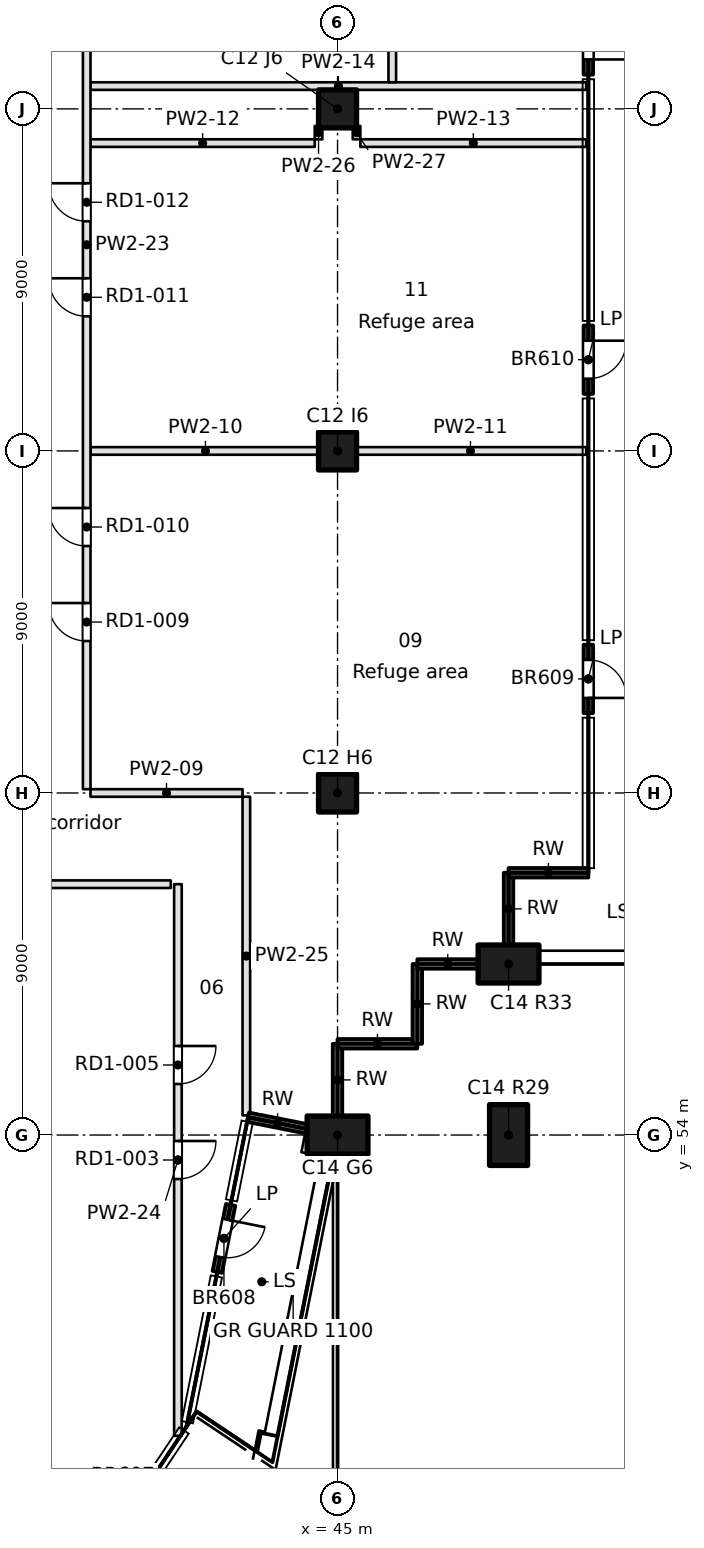
"""IFC4 building model, lengths in metres.
Left out: names, types, materials, properties, quantities, classifications, styles, units other than length and angle.
Written with IfcOpenShell. Run it as: python <this file> out.ifc"""

import sys

from ifc_helpers import new_model, si_unit, direction, frame, frame_2d, origin, origin_2d, place, context, subcontext, project, spatial, rectangle, extrude, element, fill, save


model = new_model("IFC4")
c1 = context("Model", 3, precision=1e-05, world=origin(), true_north=direction((0.0, 1.0)))
c2 = subcontext(c1, "Body", "Model", "MODEL_VIEW")
j1 = project(units=[si_unit("LENGTHUNIT", "METRE"), si_unit("PLANEANGLEUNIT", "RADIAN")], contexts=[c1])
p1 = place(None, origin())
s1 = spatial("IfcSite", under=j1, at=p1, CompositionType="ELEMENT")
p2 = place(p1, origin())
s2 = spatial("IfcBuilding", under=s1, at=p2, CompositionType="ELEMENT")
p3 = place(p2, frame((0.0, 0.0, 276.2)))
s3 = spatial("IfcBuildingStorey", under=s2, at=p3, CompositionType="ELEMENT", Elevation=276.2)
for number, where, z_axis, x_axis in (
    (1, (45.0, 54.0, 0.0), (0.0, 0.0, 1.0), (1.0, 0.0, 0.0)),
    (2, (49.5, 54.0, 0.0), (0.0, 0.0, 1.0), (0.0, 1.0, 0.0)),
    (3, (49.5, 58.5, 0.0), (0.0, 0.0, 1.0), (1.0, 0.0, 0.0)),
):
    element("IfcColumn", number, at=place(p3, frame(where, z_axis=z_axis, x_axis=x_axis)), inside=s3, PredefinedType="COLUMN", context=c2, shape_type="SweptSolid", body=[
        extrude(rectangle(XDim=1.6, YDim=1.0, at=origin_2d()), origin(), (0.0, 0.0, 1.0), 4.6),
    ])
for number, where, z_axis, x_axis in (
    (4, (45.0, 63.0, 0.0), (0.0, 0.0, 1.0), (1.0, 0.0, 0.0)),
    (5, (45.0, 72.0, 0.0), (0.0, 0.0, 1.0), (1.0, 0.0, 0.0)),
    (6, (45.0, 81.0, 0.0), (0.0, 0.0, 1.0), (1.0, 0.0, 0.0)),
):
    element("IfcColumn", number, at=place(p3, frame(where, z_axis=z_axis, x_axis=x_axis)), inside=s3, PredefinedType="COLUMN", context=c2, shape_type="SweptSolid", body=[
        extrude(rectangle(XDim=1.0, YDim=1.0, at=origin_2d()), origin(), (0.0, 0.0, 1.0), 4.6),
    ])
p4 = place(p3, frame((41.835, 50.398, 0.0), z_axis=(0.0, 0.0, 1.0), x_axis=(0.19517704197, 0.980768026746, 0.0)))
e7 = element("IfcWall", 7, at=p4, inside=s3, PredefinedType="SOLIDWALL", context=c2, shape_type="SweptSolid", body=[
    extrude(rectangle(XDim=1.8, YDim=0.25, at=frame_2d((0.9, 0.0))), origin(), (0.0, 0.0, 1.0), 4.2),
])
p5 = place(p4, frame((0.4, 0.0, 0.0)))
e8 = element("IfcOpeningElement", 8, at=p5, cuts=e7, PredefinedType="OPENING", context=c2, shape_type="SweptSolid", body=[
    extrude(rectangle(XDim=1.0, YDim=2.1, at=frame_2d((0.5, 1.05))), frame((0.0, 0.125, 0.0), z_axis=(0.0, -1.0, 0.0), x_axis=(1.0, 0.0, 0.0)), (0.0, 0.0, 1.0), 0.25),
])
p6 = place(p3, frame((42.645, 54.469, 0.0), z_axis=(0.0, 0.0, 1.0), x_axis=(0.980834583039, -0.194842297039, 0.0)))
e9 = element("IfcWall", 9, at=p6, inside=s3, PredefinedType="SOLIDWALL", context=c2, shape_type="SweptSolid", body=[
    extrude(rectangle(XDim=1.585, YDim=0.25, at=frame_2d((0.792, 0.0))), origin(), (0.0, 0.0, 1.0), 4.2),
])
p7 = place(p3, frame((44.999, 54.5, 0.0), z_axis=(0.0, 0.0, 1.0), x_axis=(0.000128452151, 0.99999999175, 0.0)))
e10 = element("IfcWall", 10, at=p7, inside=s3, PredefinedType="SOLIDWALL", context=c2, shape_type="SweptSolid", body=[
    extrude(rectangle(XDim=1.901, YDim=0.25, at=frame_2d((0.95, 0.0))), origin(), (0.0, 0.0, 1.0), 4.2),
])
p8 = place(p3, frame((44.999, 56.401, 0.0), z_axis=(0.0, 0.0, 1.0), x_axis=(0.999999993241, 0.00011626555, 0.0)))
e11 = element("IfcWall", 11, at=p8, inside=s3, PredefinedType="SOLIDWALL", context=c2, shape_type="SweptSolid", body=[
    extrude(rectangle(XDim=2.1, YDim=0.25, at=frame_2d((1.05, 0.0))), origin(), (0.0, 0.0, 1.0), 4.2),
])
p9 = place(p3, frame((47.099, 56.401, 0.0), z_axis=(0.0, 0.0, 1.0), x_axis=(0.000232504063, 0.999999972971, 0.0)))
e12 = element("IfcWall", 12, at=p9, inside=s3, PredefinedType="SOLIDWALL", context=c2, shape_type="SweptSolid", body=[
    extrude(rectangle(XDim=2.1, YDim=0.25, at=frame_2d((1.05, 0.0))), origin(), (0.0, 0.0, 1.0), 4.2),
])
p10 = place(p3, frame((47.1, 58.501, 0.0), z_axis=(0.0, 0.0, 1.0), x_axis=(1.0, 0.0, 0.0)))
e13 = element("IfcWall", 13, at=p10, inside=s3, PredefinedType="SOLIDWALL", context=c2, shape_type="SweptSolid", body=[
    extrude(rectangle(XDim=1.6, YDim=0.25, at=frame_2d((0.8, 0.0))), origin(), (0.0, 0.0, 1.0), 4.2),
])
p11 = place(p3, frame((49.499, 59.0, 0.0), z_axis=(0.0, 0.0, 1.0), x_axis=(0.000256871299, 0.999999967009, 0.0)))
e14 = element("IfcWall", 14, at=p11, inside=s3, PredefinedType="SOLIDWALL", context=c2, shape_type="SweptSolid", body=[
    extrude(rectangle(XDim=1.901, YDim=0.25, at=frame_2d((0.95, 0.0))), origin(), (0.0, 0.0, 1.0), 4.2),
])
p12 = place(p3, frame((49.5, 60.901, 0.0), z_axis=(0.0, 0.0, 1.0), x_axis=(1.0, 0.0, 0.0)))
e15 = element("IfcWall", 15, at=p12, inside=s3, PredefinedType="SOLIDWALL", context=c2, shape_type="SweptSolid", body=[
    extrude(rectangle(XDim=2.1, YDim=0.25, at=frame_2d((1.05, 0.0))), origin(), (0.0, 0.0, 1.0), 4.2),
])
p13 = place(p3, frame((51.599, 65.101, 0.0), z_axis=(0.0, 0.0, 1.0), x_axis=(0.0, 1.0, 0.0)))
e16 = element("IfcWall", 16, at=p13, inside=s3, PredefinedType="SOLIDWALL", context=c2, shape_type="SweptSolid", body=[
    extrude(rectangle(XDim=1.8, YDim=0.25, at=frame_2d((0.9, 0.0))), origin(), (0.0, 0.0, 1.0), 4.2),
])
p14 = place(p13, frame((0.4, 0.0, 0.0)))
e17 = element("IfcOpeningElement", 17, at=p14, cuts=e16, PredefinedType="OPENING", context=c2, shape_type="SweptSolid", body=[
    extrude(rectangle(XDim=1.0, YDim=2.1, at=frame_2d((0.5, 1.05))), frame((0.0, 0.125, 0.0), z_axis=(0.0, -1.0, 0.0), x_axis=(1.0, 0.0, 0.0)), (0.0, 0.0, 1.0), 0.25),
])
p15 = place(p3, frame((51.599, 73.501, 0.0), z_axis=(0.0, 0.0, 1.0), x_axis=(0.0, 1.0, 0.0)))
e18 = element("IfcWall", 18, at=p15, inside=s3, PredefinedType="SOLIDWALL", context=c2, shape_type="SweptSolid", body=[
    extrude(rectangle(XDim=1.8, YDim=0.25, at=frame_2d((0.9, 0.0))), origin(), (0.0, 0.0, 1.0), 4.2),
])
p16 = place(p15, frame((0.4, 0.0, 0.0)))
e19 = element("IfcOpeningElement", 19, at=p16, cuts=e18, PredefinedType="OPENING", context=c2, shape_type="SweptSolid", body=[
    extrude(rectangle(XDim=1.0, YDim=2.1, at=frame_2d((0.5, 1.05))), frame((0.0, 0.125, 0.0), z_axis=(0.0, -1.0, 0.0), x_axis=(1.0, 0.0, 0.0)), (0.0, 0.0, 1.0), 0.25),
])
p17 = place(p3, frame((51.599, 81.9, 0.0), z_axis=(0.0, 0.0, 1.0), x_axis=(0.0, 1.0, 0.0)))
e20 = element("IfcWall", 20, at=p17, inside=s3, PredefinedType="SOLIDWALL", context=c2, shape_type="SweptSolid", body=[
    extrude(rectangle(XDim=1.8, YDim=0.25, at=frame_2d((0.9, 0.0))), origin(), (0.0, 0.0, 1.0), 4.2),
])
p18 = place(p17, frame((0.4, 0.0, 0.0)))
e21 = element("IfcOpeningElement", 21, at=p18, cuts=e20, PredefinedType="OPENING", context=c2, shape_type="SweptSolid", body=[
    extrude(rectangle(XDim=1.0, YDim=2.1, at=frame_2d((0.5, 1.05))), frame((0.0, 0.125, 0.0), z_axis=(0.0, -1.0, 0.0), x_axis=(1.0, 0.0, 0.0)), (0.0, 0.0, 1.0), 0.25),
])
p19 = place(p3, frame((40.611, 60.6, 0.0), z_axis=(0.0, 0.0, 1.0), x_axis=(-1.0, 0.0, 0.0)))
e22 = element("IfcWall", 22, at=p19, inside=s3, PredefinedType="PARTITIONING", context=c2, shape_type="SweptSolid", body=[
    extrude(rectangle(XDim=14.411, YDim=0.2, at=frame_2d((7.206, 0.0))), origin(), (0.0, 0.0, 1.0), 4.2),
])
p20 = place(p3, frame((38.5, 63.0, 0.0), z_axis=(0.0, 0.0, 1.0), x_axis=(1.0, 0.0, 0.0)))
e23 = element("IfcWall", 23, at=p20, inside=s3, PredefinedType="PARTITIONING", context=c2, shape_type="SweptSolid", body=[
    extrude(rectangle(XDim=4.0, YDim=0.2, at=frame_2d((2.0, 0.0))), origin(), (0.0, 0.0, 1.0), 4.2),
])
p21 = place(p3, frame((38.5, 72.0, 0.0), z_axis=(0.0, 0.0, 1.0), x_axis=(1.0, 0.0, 0.0)))
e24 = element("IfcWall", 24, at=p21, inside=s3, PredefinedType="PARTITIONING", context=c2, shape_type="SweptSolid", body=[
    extrude(rectangle(XDim=6.05, YDim=0.2, at=frame_2d((3.025, 0.0))), origin(), (0.0, 0.0, 1.0), 4.2),
])
p22 = place(p3, frame((45.45, 72.0, 0.0), z_axis=(0.0, 0.0, 1.0), x_axis=(1.0, 0.0, 0.0)))
e25 = element("IfcWall", 25, at=p22, inside=s3, PredefinedType="PARTITIONING", context=c2, shape_type="SweptSolid", body=[
    extrude(rectangle(XDim=6.095, YDim=0.2, at=frame_2d((3.047, 0.0))), origin(), (0.0, 0.0, 1.0), 4.2),
])
p23 = place(p3, frame((38.5, 80.1, 0.0), z_axis=(0.0, 0.0, 1.0), x_axis=(1.0, 0.0, 0.0)))
e26 = element("IfcWall", 26, at=p23, inside=s3, PredefinedType="PARTITIONING", context=c2, shape_type="SweptSolid", body=[
    extrude(rectangle(XDim=5.9, YDim=0.2, at=frame_2d((2.95, 0.0))), origin(), (0.0, 0.0, 1.0), 4.2),
])
p24 = place(p3, frame((45.6, 80.1, 0.0), z_axis=(0.0, 0.0, 1.0), x_axis=(1.0, 0.0, 0.0)))
e27 = element("IfcWall", 27, at=p24, inside=s3, PredefinedType="PARTITIONING", context=c2, shape_type="SweptSolid", body=[
    extrude(rectangle(XDim=5.945, YDim=0.2, at=frame_2d((2.972, 0.0))), origin(), (0.0, 0.0, 1.0), 4.2),
])
p25 = place(p3, frame((38.5, 81.6, 0.0), z_axis=(0.0, 0.0, 1.0), x_axis=(1.0, 0.0, 0.0)))
e28 = element("IfcWall", 28, at=p25, inside=s3, PredefinedType="PARTITIONING", context=c2, shape_type="SweptSolid", body=[
    extrude(rectangle(XDim=13.045, YDim=0.2, at=frame_2d((6.522, 0.0))), origin(), (0.0, 0.0, 1.0), 4.2),
])
p26 = place(p3, frame((38.4, 91.75, 0.0), z_axis=(0.0, 0.0, 1.0), x_axis=(0.0, -1.0, 0.0)))
e29 = element("IfcWall", 29, at=p26, inside=s3, PredefinedType="PARTITIONING", context=c2, shape_type="SweptSolid", body=[
    extrude(rectangle(XDim=28.65, YDim=0.2, at=frame_2d((14.325, 0.0))), origin(), (0.0, 0.0, 1.0), 4.2),
])
p27 = place(p26, frame((23.752, 0.0, 0.0)))
e30 = element("IfcOpeningElement", 30, at=p27, cuts=e29, PredefinedType="OPENING", context=c2, shape_type="SweptSolid", body=[
    extrude(rectangle(XDim=1.0, YDim=2.1, at=frame_2d((0.5, 1.05))), frame((0.0, 0.1, 0.0), z_axis=(0.0, -1.0, 0.0), x_axis=(1.0, 0.0, 0.0)), (0.0, 0.0, 1.0), 0.2),
])
p28 = place(p26, frame((21.252, 0.0, 0.0)))
e31 = element("IfcOpeningElement", 31, at=p28, cuts=e29, PredefinedType="OPENING", context=c2, shape_type="SweptSolid", body=[
    extrude(rectangle(XDim=1.0, YDim=2.1, at=frame_2d((0.5, 1.05))), frame((0.0, 0.1, 0.0), z_axis=(0.0, -1.0, 0.0), x_axis=(1.0, 0.0, 0.0)), (0.0, 0.0, 1.0), 0.2),
])
p29 = place(p26, frame((15.207, 0.0, 0.0)))
e32 = element("IfcOpeningElement", 32, at=p29, cuts=e29, PredefinedType="OPENING", context=c2, shape_type="SweptSolid", body=[
    extrude(rectangle(XDim=1.0, YDim=2.1, at=frame_2d((0.5, 1.05))), frame((0.0, 0.1, 0.0), z_axis=(0.0, -1.0, 0.0), x_axis=(1.0, 0.0, 0.0)), (0.0, 0.0, 1.0), 0.2),
])
p30 = place(p26, frame((12.707, 0.0, 0.0)))
e33 = element("IfcOpeningElement", 33, at=p30, cuts=e29, PredefinedType="OPENING", context=c2, shape_type="SweptSolid", body=[
    extrude(rectangle(XDim=1.0, YDim=2.1, at=frame_2d((0.5, 1.05))), frame((0.0, 0.1, 0.0), z_axis=(0.0, -1.0, 0.0), x_axis=(1.0, 0.0, 0.0)), (0.0, 0.0, 1.0), 0.2),
])
p31 = place(p26, frame((4.526, 0.0, 0.0)))
e34 = element("IfcOpeningElement", 34, at=p31, cuts=e29, PredefinedType="OPENING", context=c2, shape_type="SweptSolid", body=[
    extrude(rectangle(XDim=1.0, YDim=2.1, at=frame_2d((0.5, 1.05))), frame((0.0, 0.1, 0.0), z_axis=(0.0, -1.0, 0.0), x_axis=(1.0, 0.0, 0.0)), (0.0, 0.0, 1.0), 0.2),
])
p32 = place(p3, frame((40.8, 46.086, 0.0), z_axis=(0.0, 0.0, 1.0), x_axis=(0.0, 1.0, 0.0)))
e35 = element("IfcWall", 35, at=p32, inside=s3, PredefinedType="PARTITIONING", context=c2, shape_type="SweptSolid", body=[
    extrude(rectangle(XDim=14.514, YDim=0.2, at=frame_2d((7.257, 0.0))), origin(), (0.0, 0.0, 1.0), 4.2),
])
p33 = place(p32, frame((6.757, 0.0, 0.0)))
e36 = element("IfcOpeningElement", 36, at=p33, cuts=e35, PredefinedType="OPENING", context=c2, shape_type="SweptSolid", body=[
    extrude(rectangle(XDim=1.0, YDim=2.1, at=frame_2d((0.5, 1.05))), frame((0.0, 0.1, 0.0), z_axis=(0.0, -1.0, 0.0), x_axis=(1.0, 0.0, 0.0)), (0.0, 0.0, 1.0), 0.2),
])
p34 = place(p32, frame((9.257, 0.0, 0.0)))
e37 = element("IfcOpeningElement", 37, at=p34, cuts=e35, PredefinedType="OPENING", context=c2, shape_type="SweptSolid", body=[
    extrude(rectangle(XDim=1.0, YDim=2.1, at=frame_2d((0.5, 1.05))), frame((0.0, 0.1, 0.0), z_axis=(0.0, -1.0, 0.0), x_axis=(1.0, 0.0, 0.0)), (0.0, 0.0, 1.0), 0.2),
])
p35 = place(p3, frame((42.6, 62.9, 0.0), z_axis=(0.0, 0.0, 1.0), x_axis=(0.0, -1.0, 0.0)))
e38 = element("IfcWall", 38, at=p35, inside=s3, PredefinedType="PARTITIONING", context=c2, shape_type="SweptSolid", body=[
    extrude(rectangle(XDim=8.382, YDim=0.2, at=frame_2d((4.191, 0.0))), origin(), (0.0, 0.0, 1.0), 4.2),
])
for number, where, z_axis, x_axis in (
    (39, (44.5, 80.55, 0.0), (0.0, 0.0, 1.0), (0.0, -1.0, 0.0)),
    (40, (45.5, 80.55, 0.0), (0.0, 0.0, 1.0), (0.0, -1.0, 0.0)),
):
    element("IfcWall", number, at=place(p3, frame(where, z_axis=z_axis, x_axis=x_axis)), inside=s3, PredefinedType="PARTITIONING", context=c2, shape_type="SweptSolid", body=[
        extrude(rectangle(XDim=0.35, YDim=0.2, at=frame_2d((0.175, 0.0))), origin(), (0.0, 0.0, 1.0), 4.2),
    ])
p36 = place(p3, frame((46.44, 91.75, 0.0), z_axis=(0.0, 0.0, 1.0), x_axis=(0.0, -1.0, 0.0)))
e41 = element("IfcWall", 41, at=p36, inside=s3, PredefinedType="PARTITIONING", context=c2, shape_type="SweptSolid", body=[
    extrude(rectangle(XDim=10.05, YDim=0.2, at=frame_2d((5.025, 0.0))), origin(), (0.0, 0.0, 1.0), 4.2),
])
p37 = place(p5, frame((1.0, 0.0, 0.0), z_axis=(0.0, 0.0, 1.0), x_axis=(-1.0, 0.0, 0.0)))
e42 = element("IfcDoor", 42, at=p37, inside=s3, OperationType="SINGLE_SWING_LEFT", PredefinedType="DOOR", context=c2, shape_type="SweptSolid", body=[
    extrude(rectangle(XDim=1.0, YDim=2.1, at=frame_2d((0.5, 1.05))), frame((0.0, 0.025, 0.0), z_axis=(0.0, -1.0, 0.0), x_axis=(1.0, 0.0, 0.0)), (0.0, 0.0, 1.0), 0.05),
])
fill(e8, e42)
p38 = place(p14, frame((1.0, 0.0, 0.0), z_axis=(0.0, 0.0, 1.0), x_axis=(-1.0, 0.0, 0.0)))
e43 = element("IfcDoor", 43, at=p38, inside=s3, OperationType="SINGLE_SWING_RIGHT", PredefinedType="DOOR", context=c2, shape_type="SweptSolid", body=[
    extrude(rectangle(XDim=1.0, YDim=2.1, at=frame_2d((0.5, 1.05))), frame((0.0, 0.025, 0.0), z_axis=(0.0, -1.0, 0.0), x_axis=(1.0, 0.0, 0.0)), (0.0, 0.0, 1.0), 0.05),
])
fill(e17, e43)
p39 = place(p16, frame((1.0, 0.0, 0.0), z_axis=(0.0, 0.0, 1.0), x_axis=(-1.0, 0.0, 0.0)))
e44 = element("IfcDoor", 44, at=p39, inside=s3, OperationType="SINGLE_SWING_LEFT", PredefinedType="DOOR", context=c2, shape_type="SweptSolid", body=[
    extrude(rectangle(XDim=1.0, YDim=2.1, at=frame_2d((0.5, 1.05))), frame((0.0, 0.025, 0.0), z_axis=(0.0, -1.0, 0.0), x_axis=(1.0, 0.0, 0.0)), (0.0, 0.0, 1.0), 0.05),
])
fill(e19, e44)
p40 = place(p18, frame((1.0, 0.0, 0.0), z_axis=(0.0, 0.0, 1.0), x_axis=(-1.0, 0.0, 0.0)))
e45 = element("IfcDoor", 45, at=p40, inside=s3, OperationType="SINGLE_SWING_RIGHT", PredefinedType="DOOR", context=c2, shape_type="SweptSolid", body=[
    extrude(rectangle(XDim=1.0, YDim=2.1, at=frame_2d((0.5, 1.05))), frame((0.0, 0.025, 0.0), z_axis=(0.0, -1.0, 0.0), x_axis=(1.0, 0.0, 0.0)), (0.0, 0.0, 1.0), 0.05),
])
fill(e21, e45)
p41 = place(p33, frame((1.0, 0.0, 0.0), z_axis=(0.0, 0.0, 1.0), x_axis=(-1.0, 0.0, 0.0)))
e46 = element("IfcDoor", 46, at=p41, inside=s3, OperationType="SINGLE_SWING_LEFT", PredefinedType="DOOR", context=c2, shape_type="SweptSolid", body=[
    extrude(rectangle(XDim=1.0, YDim=2.1, at=frame_2d((0.5, 1.05))), frame((0.0, 0.025, 0.0), z_axis=(0.0, -1.0, 0.0), x_axis=(1.0, 0.0, 0.0)), (0.0, 0.0, 1.0), 0.05),
])
fill(e36, e46)
p42 = place(p34, frame((1.0, 0.0, 0.0), z_axis=(0.0, 0.0, 1.0), x_axis=(-1.0, 0.0, 0.0)))
e47 = element("IfcDoor", 47, at=p42, inside=s3, OperationType="SINGLE_SWING_LEFT", PredefinedType="DOOR", context=c2, shape_type="SweptSolid", body=[
    extrude(rectangle(XDim=1.0, YDim=2.1, at=frame_2d((0.5, 1.05))), frame((0.0, 0.025, 0.0), z_axis=(0.0, -1.0, 0.0), x_axis=(1.0, 0.0, 0.0)), (0.0, 0.0, 1.0), 0.05),
])
fill(e37, e47)
p43 = place(p27, frame((1.0, 0.0, 0.0), z_axis=(0.0, 0.0, 1.0), x_axis=(-1.0, 0.0, 0.0)))
e48 = element("IfcDoor", 48, at=p43, inside=s3, OperationType="SINGLE_SWING_RIGHT", PredefinedType="DOOR", context=c2, shape_type="SweptSolid", body=[
    extrude(rectangle(XDim=1.0, YDim=2.1, at=frame_2d((0.5, 1.05))), frame((0.0, 0.025, 0.0), z_axis=(0.0, -1.0, 0.0), x_axis=(1.0, 0.0, 0.0)), (0.0, 0.0, 1.0), 0.05),
])
fill(e30, e48)
p44 = place(p28, frame((1.0, 0.0, 0.0), z_axis=(0.0, 0.0, 1.0), x_axis=(-1.0, 0.0, 0.0)))
e49 = element("IfcDoor", 49, at=p44, inside=s3, OperationType="SINGLE_SWING_RIGHT", PredefinedType="DOOR", context=c2, shape_type="SweptSolid", body=[
    extrude(rectangle(XDim=1.0, YDim=2.1, at=frame_2d((0.5, 1.05))), frame((0.0, 0.025, 0.0), z_axis=(0.0, -1.0, 0.0), x_axis=(1.0, 0.0, 0.0)), (0.0, 0.0, 1.0), 0.05),
])
fill(e31, e49)
p45 = place(p29, frame((1.0, 0.0, 0.0), z_axis=(0.0, 0.0, 1.0), x_axis=(-1.0, 0.0, 0.0)))
e50 = element("IfcDoor", 50, at=p45, inside=s3, OperationType="SINGLE_SWING_RIGHT", PredefinedType="DOOR", context=c2, shape_type="SweptSolid", body=[
    extrude(rectangle(XDim=1.0, YDim=2.1, at=frame_2d((0.5, 1.05))), frame((0.0, 0.025, 0.0), z_axis=(0.0, -1.0, 0.0), x_axis=(1.0, 0.0, 0.0)), (0.0, 0.0, 1.0), 0.05),
])
fill(e32, e50)
p46 = place(p30, frame((1.0, 0.0, 0.0), z_axis=(0.0, 0.0, 1.0), x_axis=(-1.0, 0.0, 0.0)))
e51 = element("IfcDoor", 51, at=p46, inside=s3, OperationType="SINGLE_SWING_RIGHT", PredefinedType="DOOR", context=c2, shape_type="SweptSolid", body=[
    extrude(rectangle(XDim=1.0, YDim=2.1, at=frame_2d((0.5, 1.05))), frame((0.0, 0.025, 0.0), z_axis=(0.0, -1.0, 0.0), x_axis=(1.0, 0.0, 0.0)), (0.0, 0.0, 1.0), 0.05),
])
fill(e33, e51)
save(model, sys.argv[1])
